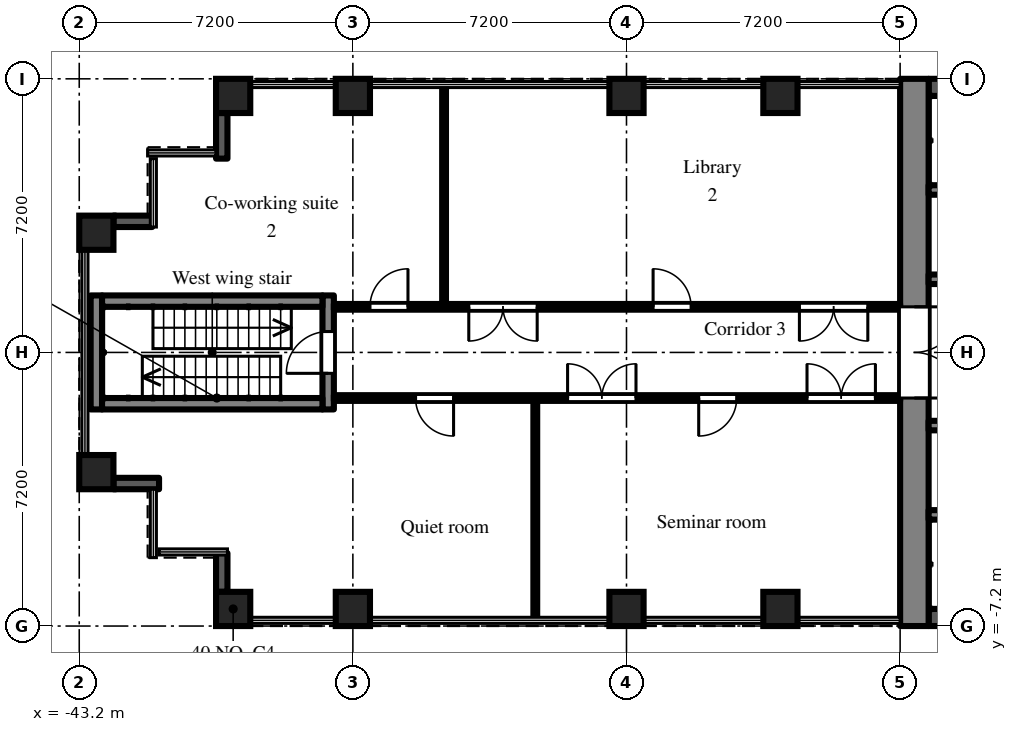
"""IFC4 building model, lengths in metres.
Left out: names, types, materials, properties, quantities, classifications, styles, units other than length and angle.
Written with IfcOpenShell. Run it as: python <this file> out.ifc"""

import sys

from ifc_helpers import new_model, si_unit, direction, frame, frame_2d, origin, origin_2d, place, context, subcontext, project, spatial, rectangle, extrude, element, fill, save


model = new_model("IFC4")
c1 = context("Model", 3, precision=1e-05, world=origin(), true_north=direction((0.0, 1.0)))
c2 = subcontext(c1, "Body", "Model", "MODEL_VIEW")
j1 = project(units=[si_unit("LENGTHUNIT", "METRE"), si_unit("PLANEANGLEUNIT", "RADIAN")], contexts=[c1])
p1 = place(None, origin())
s1 = spatial("IfcSite", under=j1, at=p1, CompositionType="ELEMENT")
p2 = place(p1, origin())
s2 = spatial("IfcBuilding", under=s1, at=p2, CompositionType="ELEMENT")
p3 = place(p2, frame((0.0, 0.0, 116.1)))
s3 = spatial("IfcBuildingStorey", under=s2, at=p3, CompositionType="ELEMENT", Elevation=116.1)
for number, where, z_axis, x_axis in (
    (1, (-42.75, -3.15, 0.0), (0.0, 0.0, 1.0), (1.0, 0.0, 0.0)),
    (2, (-42.75, 3.15, 0.0), (0.0, 0.0, 1.0), (1.0, 0.0, 0.0)),
    (3, (-39.15, -6.75, 0.0), (0.0, 0.0, 1.0), (1.0, 0.0, 0.0)),
    (4, (-39.15, 6.75, 0.0), (0.0, 0.0, 1.0), (1.0, 0.0, 0.0)),
    (5, (-36.0, -6.75, 0.0), (0.0, 0.0, 1.0), (1.0, 0.0, 0.0)),
    (6, (-36.0, 6.75, 0.0), (0.0, 0.0, 1.0), (1.0, 0.0, 0.0)),
    (7, (-28.8, -6.75, 0.0), (0.0, 0.0, 1.0), (1.0, 0.0, 0.0)),
    (8, (-28.8, 6.75, 0.0), (0.0, 0.0, 1.0), (1.0, 0.0, 0.0)),
    (9, (-24.75, -6.75, 0.0), (0.0, 0.0, 1.0), (1.0, 0.0, 0.0)),
    (10, (-24.75, 6.75, 0.0), (0.0, 0.0, 1.0), (1.0, 0.0, 0.0)),
):
    element("IfcColumn", number, at=place(p3, frame(where, z_axis=z_axis, x_axis=x_axis)), inside=s3, PredefinedType="COLUMN", context=c2, shape_type="SweptSolid", body=[
        extrude(rectangle(XDim=0.9, YDim=0.9, at=origin_2d()), origin(), (0.0, 0.0, 1.0), 4.2),
    ])
p4 = place(p3, frame((-39.45, 6.3, 0.0), z_axis=(0.0, 0.0, 1.0), x_axis=(0.0, -1.0, 0.0)))
e11 = element("IfcWall", 11, at=p4, inside=s3, PredefinedType="SOLIDWALL", context=c2, shape_type="SweptSolid", body=[
    extrude(rectangle(XDim=1.2, YDim=0.3, at=frame_2d((0.6, 0.0))), origin(), (0.0, 0.0, 1.0), 3.8),
])
p5 = place(p3, frame((-41.28, 3.45, 0.0), z_axis=(0.0, 0.0, 1.0), x_axis=(-1.0, 0.0, 0.0)))
e12 = element("IfcWall", 12, at=p5, inside=s3, PredefinedType="SOLIDWALL", context=c2, shape_type="SweptSolid", body=[
    extrude(rectangle(XDim=1.02, YDim=0.3, at=frame_2d((0.51, 0.0))), origin(), (0.0, 0.0, 1.0), 3.8),
])
p6 = place(p3, frame((-42.3, -3.45, 0.0), z_axis=(0.0, 0.0, 1.0), x_axis=(1.0, 0.0, 0.0)))
e13 = element("IfcWall", 13, at=p6, inside=s3, PredefinedType="SOLIDWALL", context=c2, shape_type="SweptSolid", body=[
    extrude(rectangle(XDim=1.2, YDim=0.3, at=frame_2d((0.6, 0.0))), origin(), (0.0, 0.0, 1.0), 3.8),
])
p7 = place(p3, frame((-39.45, -5.28, 0.0), z_axis=(0.0, 0.0, 1.0), x_axis=(0.0, -1.0, 0.0)))
e14 = element("IfcWall", 14, at=p7, inside=s3, PredefinedType="SOLIDWALL", context=c2, shape_type="SweptSolid", body=[
    extrude(rectangle(XDim=1.02, YDim=0.3, at=frame_2d((0.51, 0.0))), origin(), (0.0, 0.0, 1.0), 3.8),
])
p8 = place(p3, frame((-21.225, -7.2, 0.0), z_axis=(0.0, 0.0, 1.0), x_axis=(0.0, 1.0, 0.0)))
e15 = element("IfcWall", 15, at=p8, inside=s3, PredefinedType="SHEAR", context=c2, shape_type="SweptSolid", body=[
    extrude(rectangle(XDim=14.4, YDim=0.75, at=frame_2d((7.2, 0.0))), origin(), (0.0, 0.0, 1.0), 3.8),
])
p9 = place(p8, frame((6.0, 0.0, 0.0)))
e16 = element("IfcOpeningElement", 16, at=p9, cuts=e15, PredefinedType="OPENING", context=c2, shape_type="SweptSolid", body=[
    extrude(rectangle(XDim=2.4, YDim=2.2, at=frame_2d((1.2, 1.1))), frame((0.0, 0.385, 0.0), z_axis=(0.0, -1.0, 0.0), x_axis=(1.0, 0.0, 0.0)), (0.0, 0.0, 1.0), 0.77),
])
p10 = place(p3, frame((-7.9, 6.975, 0.0), z_axis=(0.0, 0.0, 1.0), x_axis=(-1.0, 0.0, 0.0)))
e17 = element("IfcWall", 17, at=p10, inside=s3, PredefinedType="SHEAR", context=c2, shape_type="SweptSolid", body=[
    extrude(rectangle(XDim=12.95, YDim=0.45, at=frame_2d((6.475, 0.0))), origin(), (0.0, 0.0, 1.0), 3.8),
])
p11 = place(p3, frame((-7.9, 1.925, 0.0), z_axis=(0.0, 0.0, 1.0), x_axis=(-1.0, 0.0, 0.0)))
e18 = element("IfcWall", 18, at=p11, inside=s3, PredefinedType="SHEAR", context=c2, shape_type="SweptSolid", body=[
    extrude(rectangle(XDim=12.95, YDim=0.25, at=frame_2d((6.475, 0.0))), origin(), (0.0, 0.0, 1.0), 3.8),
])
p12 = place(p11, frame((4.825, 0.0, 0.0)))
e19 = element("IfcOpeningElement", 19, at=p12, cuts=e18, PredefinedType="OPENING", context=c2, shape_type="SweptSolid", body=[
    extrude(rectangle(XDim=1.1, YDim=2.1, at=frame_2d((0.55, 1.05))), frame((0.0, 0.135, 0.0), z_axis=(0.0, -1.0, 0.0), x_axis=(1.0, 0.0, 0.0)), (0.0, 0.0, 1.0), 0.27),
])
p13 = place(p11, frame((7.025, 0.0, 0.0)))
e20 = element("IfcOpeningElement", 20, at=p13, cuts=e18, PredefinedType="OPENING", context=c2, shape_type="SweptSolid", body=[
    extrude(rectangle(XDim=1.1, YDim=2.1, at=frame_2d((0.55, 1.05))), frame((0.0, 0.135, 0.0), z_axis=(0.0, -1.0, 0.0), x_axis=(1.0, 0.0, 0.0)), (0.0, 0.0, 1.0), 0.27),
])
p14 = place(p11, frame((9.225, 0.0, 0.0)))
e21 = element("IfcOpeningElement", 21, at=p14, cuts=e18, PredefinedType="OPENING", context=c2, shape_type="SweptSolid", body=[
    extrude(rectangle(XDim=1.1, YDim=2.1, at=frame_2d((0.55, 1.05))), frame((0.0, 0.135, 0.0), z_axis=(0.0, -1.0, 0.0), x_axis=(1.0, 0.0, 0.0)), (0.0, 0.0, 1.0), 0.27),
])
p15 = place(p11, frame((11.425, 0.0, 0.0)))
e22 = element("IfcOpeningElement", 22, at=p15, cuts=e18, PredefinedType="OPENING", context=c2, shape_type="SweptSolid", body=[
    extrude(rectangle(XDim=1.1, YDim=2.1, at=frame_2d((0.55, 1.05))), frame((0.0, 0.135, 0.0), z_axis=(0.0, -1.0, 0.0), x_axis=(1.0, 0.0, 0.0)), (0.0, 0.0, 1.0), 0.27),
])
p16 = place(p11, frame((0.525, 0.0, 0.0)))
e23 = element("IfcOpeningElement", 23, at=p16, cuts=e18, PredefinedType="OPENING", context=c2, shape_type="SweptSolid", body=[
    extrude(rectangle(XDim=0.9, YDim=2.1, at=frame_2d((0.45, 1.05))), frame((0.0, 0.135, 0.0), z_axis=(0.0, -1.0, 0.0), x_axis=(1.0, 0.0, 0.0)), (0.0, 0.0, 1.0), 0.27),
])
p17 = place(p11, frame((2.575, 0.0, 0.0)))
e24 = element("IfcOpeningElement", 24, at=p17, cuts=e18, PredefinedType="OPENING", context=c2, shape_type="SweptSolid", body=[
    extrude(rectangle(XDim=1.2, YDim=2.1, at=frame_2d((0.6, 1.05))), frame((0.0, 0.135, 0.0), z_axis=(0.0, -1.0, 0.0), x_axis=(1.0, 0.0, 0.0)), (0.0, 0.0, 1.0), 0.27),
])
p18 = place(p3, frame((-12.3, 4.275, 0.0), z_axis=(0.0, 0.0, 1.0), x_axis=(-1.0, 0.0, 0.0)))
e25 = element("IfcWall", 25, at=p18, inside=s3, PredefinedType="SHEAR", context=c2, shape_type="SweptSolid", body=[
    extrude(rectangle(XDim=8.55, YDim=0.25, at=frame_2d((4.275, 0.0))), origin(), (0.0, 0.0, 1.0), 3.8),
])
p19 = place(p3, frame((-7.9, -6.975, 0.0), z_axis=(0.0, 0.0, 1.0), x_axis=(-1.0, 0.0, 0.0)))
e26 = element("IfcWall", 26, at=p19, inside=s3, PredefinedType="SHEAR", context=c2, shape_type="SweptSolid", body=[
    extrude(rectangle(XDim=12.95, YDim=0.45, at=frame_2d((6.475, 0.0))), origin(), (0.0, 0.0, 1.0), 3.8),
])
p20 = place(p3, frame((-7.9, -1.925, 0.0), z_axis=(0.0, 0.0, 1.0), x_axis=(-1.0, 0.0, 0.0)))
e27 = element("IfcWall", 27, at=p20, inside=s3, PredefinedType="SHEAR", context=c2, shape_type="SweptSolid", body=[
    extrude(rectangle(XDim=12.95, YDim=0.25, at=frame_2d((6.475, 0.0))), origin(), (0.0, 0.0, 1.0), 3.8),
])
p21 = place(p20, frame((4.825, 0.0, 0.0)))
e28 = element("IfcOpeningElement", 28, at=p21, cuts=e27, PredefinedType="OPENING", context=c2, shape_type="SweptSolid", body=[
    extrude(rectangle(XDim=1.1, YDim=2.1, at=frame_2d((0.55, 1.05))), frame((0.0, 0.135, 0.0), z_axis=(0.0, -1.0, 0.0), x_axis=(1.0, 0.0, 0.0)), (0.0, 0.0, 1.0), 0.27),
])
p22 = place(p20, frame((7.025, 0.0, 0.0)))
e29 = element("IfcOpeningElement", 29, at=p22, cuts=e27, PredefinedType="OPENING", context=c2, shape_type="SweptSolid", body=[
    extrude(rectangle(XDim=1.1, YDim=2.1, at=frame_2d((0.55, 1.05))), frame((0.0, 0.135, 0.0), z_axis=(0.0, -1.0, 0.0), x_axis=(1.0, 0.0, 0.0)), (0.0, 0.0, 1.0), 0.27),
])
p23 = place(p20, frame((9.225, 0.0, 0.0)))
e30 = element("IfcOpeningElement", 30, at=p23, cuts=e27, PredefinedType="OPENING", context=c2, shape_type="SweptSolid", body=[
    extrude(rectangle(XDim=1.1, YDim=2.1, at=frame_2d((0.55, 1.05))), frame((0.0, 0.135, 0.0), z_axis=(0.0, -1.0, 0.0), x_axis=(1.0, 0.0, 0.0)), (0.0, 0.0, 1.0), 0.27),
])
p24 = place(p20, frame((11.425, 0.0, 0.0)))
e31 = element("IfcOpeningElement", 31, at=p24, cuts=e27, PredefinedType="OPENING", context=c2, shape_type="SweptSolid", body=[
    extrude(rectangle(XDim=1.1, YDim=2.1, at=frame_2d((0.55, 1.05))), frame((0.0, 0.135, 0.0), z_axis=(0.0, -1.0, 0.0), x_axis=(1.0, 0.0, 0.0)), (0.0, 0.0, 1.0), 0.27),
])
p25 = place(p20, frame((0.525, 0.0, 0.0)))
e32 = element("IfcOpeningElement", 32, at=p25, cuts=e27, PredefinedType="OPENING", context=c2, shape_type="SweptSolid", body=[
    extrude(rectangle(XDim=0.9, YDim=2.1, at=frame_2d((0.45, 1.05))), frame((0.0, 0.135, 0.0), z_axis=(0.0, -1.0, 0.0), x_axis=(1.0, 0.0, 0.0)), (0.0, 0.0, 1.0), 0.27),
])
p26 = place(p20, frame((2.575, 0.0, 0.0)))
e33 = element("IfcOpeningElement", 33, at=p26, cuts=e27, PredefinedType="OPENING", context=c2, shape_type="SweptSolid", body=[
    extrude(rectangle(XDim=1.2, YDim=2.1, at=frame_2d((0.6, 1.05))), frame((0.0, 0.135, 0.0), z_axis=(0.0, -1.0, 0.0), x_axis=(1.0, 0.0, 0.0)), (0.0, 0.0, 1.0), 0.27),
])
p27 = place(p3, frame((-12.3, -4.275, 0.0), z_axis=(0.0, 0.0, 1.0), x_axis=(-1.0, 0.0, 0.0)))
e34 = element("IfcWall", 34, at=p27, inside=s3, PredefinedType="SHEAR", context=c2, shape_type="SweptSolid", body=[
    extrude(rectangle(XDim=8.55, YDim=0.25, at=frame_2d((4.275, 0.0))), origin(), (0.0, 0.0, 1.0), 3.8),
])
p28 = place(p3, frame((-36.65, -1.5, 0.0), z_axis=(0.0, 0.0, 1.0), x_axis=(0.0, 1.0, 0.0)))
e35 = element("IfcWall", 35, at=p28, inside=s3, PredefinedType="SHEAR", context=c2, shape_type="SweptSolid", body=[
    extrude(rectangle(XDim=3.0, YDim=0.3, at=frame_2d((1.5, 0.0))), origin(), (0.0, 0.0, 1.0), 3.8),
])
p29 = place(p28, frame((0.95, 0.0, 0.0)))
e36 = element("IfcOpeningElement", 36, at=p29, cuts=e35, PredefinedType="OPENING", context=c2, shape_type="SweptSolid", body=[
    extrude(rectangle(XDim=1.1, YDim=2.1, at=frame_2d((0.55, 1.05))), frame((0.0, 0.16, 0.0), z_axis=(0.0, -1.0, 0.0), x_axis=(1.0, 0.0, 0.0)), (0.0, 0.0, 1.0), 0.32),
])
p30 = place(p3, frame((-42.75, -1.5, 0.0), z_axis=(0.0, 0.0, 1.0), x_axis=(0.0, 1.0, 0.0)))
e37 = element("IfcWall", 37, at=p30, inside=s3, PredefinedType="SHEAR", context=c2, shape_type="SweptSolid", body=[
    extrude(rectangle(XDim=3.0, YDim=0.3, at=frame_2d((1.5, 0.0))), origin(), (0.0, 0.0, 1.0), 3.8),
])
for number, where, z_axis, x_axis in (
    (38, (-36.8, -1.35, 0.0), (0.0, 0.0, 1.0), (-1.0, 0.0, 0.0)),
    (39, (-36.8, 1.35, 0.0), (0.0, 0.0, 1.0), (-1.0, 0.0, 0.0)),
):
    element("IfcWall", number, at=place(p3, frame(where, z_axis=z_axis, x_axis=x_axis)), inside=s3, PredefinedType="SHEAR", context=c2, shape_type="SweptSolid", body=[
        extrude(rectangle(XDim=5.8, YDim=0.3, at=frame_2d((2.9, 0.0))), origin(), (0.0, 0.0, 1.0), 3.8),
    ])
p31 = place(p3, frame((-36.5, -1.2, 0.0), z_axis=(0.0, 0.0, 1.0), x_axis=(1.0, 0.0, 0.0)))
e40 = element("IfcWall", 40, at=p31, inside=s3, PredefinedType="PARTITIONING", context=c2, shape_type="SweptSolid", body=[
    extrude(rectangle(XDim=14.9, YDim=0.15, at=frame_2d((7.45, 0.0))), origin(), (0.0, 0.0, 1.0), 3.8),
])
p32 = place(p31, frame((6.15, 0.0, 0.0)))
e41 = element("IfcOpeningElement", 41, at=p32, cuts=e40, PredefinedType="OPENING", context=c2, shape_type="SweptSolid", body=[
    extrude(rectangle(XDim=1.8, YDim=2.1, at=frame_2d((0.9, 1.05))), frame((0.0, 0.085, 0.0), z_axis=(0.0, -1.0, 0.0), x_axis=(1.0, 0.0, 0.0)), (0.0, 0.0, 1.0), 0.17),
])
p33 = place(p31, frame((9.6, 0.0, 0.0)))
e42 = element("IfcOpeningElement", 42, at=p33, cuts=e40, PredefinedType="OPENING", context=c2, shape_type="SweptSolid", body=[
    extrude(rectangle(XDim=1.0, YDim=2.1, at=frame_2d((0.5, 1.05))), frame((0.0, 0.085, 0.0), z_axis=(0.0, -1.0, 0.0), x_axis=(1.0, 0.0, 0.0)), (0.0, 0.0, 1.0), 0.17),
])
p34 = place(p31, frame((12.45, 0.0, 0.0)))
e43 = element("IfcOpeningElement", 43, at=p34, cuts=e40, PredefinedType="OPENING", context=c2, shape_type="SweptSolid", body=[
    extrude(rectangle(XDim=1.8, YDim=2.1, at=frame_2d((0.9, 1.05))), frame((0.0, 0.085, 0.0), z_axis=(0.0, -1.0, 0.0), x_axis=(1.0, 0.0, 0.0)), (0.0, 0.0, 1.0), 0.17),
])
p35 = place(p31, frame((2.15, 0.0, 0.0)))
e44 = element("IfcOpeningElement", 44, at=p35, cuts=e40, PredefinedType="OPENING", context=c2, shape_type="SweptSolid", body=[
    extrude(rectangle(XDim=1.0, YDim=2.1, at=frame_2d((0.5, 1.05))), frame((0.0, 0.085, 0.0), z_axis=(0.0, -1.0, 0.0), x_axis=(1.0, 0.0, 0.0)), (0.0, 0.0, 1.0), 0.17),
])
p36 = place(p3, frame((-36.5, 1.2, 0.0), z_axis=(0.0, 0.0, 1.0), x_axis=(1.0, 0.0, 0.0)))
e45 = element("IfcWall", 45, at=p36, inside=s3, PredefinedType="PARTITIONING", context=c2, shape_type="SweptSolid", body=[
    extrude(rectangle(XDim=14.9, YDim=0.15, at=frame_2d((7.45, 0.0))), origin(), (0.0, 0.0, 1.0), 3.8),
])
p37 = place(p36, frame((3.55, 0.0, 0.0)))
e46 = element("IfcOpeningElement", 46, at=p37, cuts=e45, PredefinedType="OPENING", context=c2, shape_type="SweptSolid", body=[
    extrude(rectangle(XDim=1.8, YDim=2.1, at=frame_2d((0.9, 1.05))), frame((0.0, 0.085, 0.0), z_axis=(0.0, -1.0, 0.0), x_axis=(1.0, 0.0, 0.0)), (0.0, 0.0, 1.0), 0.17),
])
p38 = place(p36, frame((8.4, 0.0, 0.0)))
e47 = element("IfcOpeningElement", 47, at=p38, cuts=e45, PredefinedType="OPENING", context=c2, shape_type="SweptSolid", body=[
    extrude(rectangle(XDim=1.0, YDim=2.1, at=frame_2d((0.5, 1.05))), frame((0.0, 0.085, 0.0), z_axis=(0.0, -1.0, 0.0), x_axis=(1.0, 0.0, 0.0)), (0.0, 0.0, 1.0), 0.17),
])
p39 = place(p36, frame((12.25, 0.0, 0.0)))
e48 = element("IfcOpeningElement", 48, at=p39, cuts=e45, PredefinedType="OPENING", context=c2, shape_type="SweptSolid", body=[
    extrude(rectangle(XDim=1.8, YDim=2.1, at=frame_2d((0.9, 1.05))), frame((0.0, 0.085, 0.0), z_axis=(0.0, -1.0, 0.0), x_axis=(1.0, 0.0, 0.0)), (0.0, 0.0, 1.0), 0.17),
])
p40 = place(p36, frame((0.95, 0.0, 0.0)))
e49 = element("IfcOpeningElement", 49, at=p40, cuts=e45, PredefinedType="OPENING", context=c2, shape_type="SweptSolid", body=[
    extrude(rectangle(XDim=1.0, YDim=2.1, at=frame_2d((0.5, 1.05))), frame((0.0, 0.085, 0.0), z_axis=(0.0, -1.0, 0.0), x_axis=(1.0, 0.0, 0.0)), (0.0, 0.0, 1.0), 0.17),
])
for number, where, z_axis, x_axis in (
    (50, (-33.6, 1.275, 0.0), (0.0, 0.0, 1.0), (0.0, 1.0, 0.0)),
    (51, (-31.2, -7.02, 0.0), (0.0, 0.0, 1.0), (0.0, 1.0, 0.0)),
):
    element("IfcWall", number, at=place(p3, frame(where, z_axis=z_axis, x_axis=x_axis)), inside=s3, PredefinedType="PARTITIONING", context=c2, shape_type="SweptSolid", body=[
        extrude(rectangle(XDim=5.745, YDim=0.1, at=frame_2d((2.873, 0.0))), origin(), (0.0, 0.0, 1.0), 3.8),
    ])
p41 = place(p9, frame((2.4, 0.0, 0.0), z_axis=(0.0, 0.0, 1.0), x_axis=(-1.0, 0.0, 0.0)))
e52 = element("IfcDoor", 52, at=p41, inside=s3, OperationType="DOUBLE_DOOR_DOUBLE_SWING", PredefinedType="DOOR", context=c2, shape_type="SweptSolid", body=[
    extrude(rectangle(XDim=2.4, YDim=2.2, at=frame_2d((1.2, 1.1))), frame((0.0, 0.025, 0.0), z_axis=(0.0, -1.0, 0.0), x_axis=(1.0, 0.0, 0.0)), (0.0, 0.0, 1.0), 0.05),
])
fill(e16, e52)
p42 = place(p29, origin())
e53 = element("IfcDoor", 53, at=p42, inside=s3, OperationType="SINGLE_SWING_LEFT", PredefinedType="DOOR", context=c2, shape_type="SweptSolid", body=[
    extrude(rectangle(XDim=1.1, YDim=2.1, at=frame_2d((0.55, 1.05))), frame((0.0, 0.025, 0.0), z_axis=(0.0, -1.0, 0.0), x_axis=(1.0, 0.0, 0.0)), (0.0, 0.0, 1.0), 0.05),
])
fill(e36, e53)
p43 = place(p32, origin())
e54 = element("IfcDoor", 54, at=p43, inside=s3, OperationType="DOUBLE_DOOR_DOUBLE_SWING", PredefinedType="DOOR", context=c2, shape_type="SweptSolid", body=[
    extrude(rectangle(XDim=1.8, YDim=2.1, at=frame_2d((0.9, 1.05))), frame((0.0, 0.025, 0.0), z_axis=(0.0, -1.0, 0.0), x_axis=(1.0, 0.0, 0.0)), (0.0, 0.0, 1.0), 0.05),
])
fill(e41, e54)
p44 = place(p33, frame((1.0, 0.0, 0.0), z_axis=(0.0, 0.0, 1.0), x_axis=(-1.0, 0.0, 0.0)))
e55 = element("IfcDoor", 55, at=p44, inside=s3, OperationType="SINGLE_SWING_RIGHT", PredefinedType="DOOR", context=c2, shape_type="SweptSolid", body=[
    extrude(rectangle(XDim=1.0, YDim=2.1, at=frame_2d((0.5, 1.05))), frame((0.0, 0.025, 0.0), z_axis=(0.0, -1.0, 0.0), x_axis=(1.0, 0.0, 0.0)), (0.0, 0.0, 1.0), 0.05),
])
fill(e42, e55)
p45 = place(p34, origin())
e56 = element("IfcDoor", 56, at=p45, inside=s3, OperationType="DOUBLE_DOOR_DOUBLE_SWING", PredefinedType="DOOR", context=c2, shape_type="SweptSolid", body=[
    extrude(rectangle(XDim=1.8, YDim=2.1, at=frame_2d((0.9, 1.05))), frame((0.0, 0.025, 0.0), z_axis=(0.0, -1.0, 0.0), x_axis=(1.0, 0.0, 0.0)), (0.0, 0.0, 1.0), 0.05),
])
fill(e43, e56)
p46 = place(p35, frame((1.0, 0.0, 0.0), z_axis=(0.0, 0.0, 1.0), x_axis=(-1.0, 0.0, 0.0)))
e57 = element("IfcDoor", 57, at=p46, inside=s3, OperationType="SINGLE_SWING_LEFT", PredefinedType="DOOR", context=c2, shape_type="SweptSolid", body=[
    extrude(rectangle(XDim=1.0, YDim=2.1, at=frame_2d((0.5, 1.05))), frame((0.0, 0.025, 0.0), z_axis=(0.0, -1.0, 0.0), x_axis=(1.0, 0.0, 0.0)), (0.0, 0.0, 1.0), 0.05),
])
fill(e44, e57)
p47 = place(p37, frame((1.8, 0.0, 0.0), z_axis=(0.0, 0.0, 1.0), x_axis=(-1.0, 0.0, 0.0)))
e58 = element("IfcDoor", 58, at=p47, inside=s3, OperationType="DOUBLE_DOOR_DOUBLE_SWING", PredefinedType="DOOR", context=c2, shape_type="SweptSolid", body=[
    extrude(rectangle(XDim=1.8, YDim=2.1, at=frame_2d((0.9, 1.05))), frame((0.0, 0.025, 0.0), z_axis=(0.0, -1.0, 0.0), x_axis=(1.0, 0.0, 0.0)), (0.0, 0.0, 1.0), 0.05),
])
fill(e46, e58)
p48 = place(p38, origin())
e59 = element("IfcDoor", 59, at=p48, inside=s3, OperationType="SINGLE_SWING_LEFT", PredefinedType="DOOR", context=c2, shape_type="SweptSolid", body=[
    extrude(rectangle(XDim=1.0, YDim=2.1, at=frame_2d((0.5, 1.05))), frame((0.0, 0.025, 0.0), z_axis=(0.0, -1.0, 0.0), x_axis=(1.0, 0.0, 0.0)), (0.0, 0.0, 1.0), 0.05),
])
fill(e47, e59)
p49 = place(p39, frame((1.8, 0.0, 0.0), z_axis=(0.0, 0.0, 1.0), x_axis=(-1.0, 0.0, 0.0)))
e60 = element("IfcDoor", 60, at=p49, inside=s3, OperationType="DOUBLE_DOOR_DOUBLE_SWING", PredefinedType="DOOR", context=c2, shape_type="SweptSolid", body=[
    extrude(rectangle(XDim=1.8, YDim=2.1, at=frame_2d((0.9, 1.05))), frame((0.0, 0.025, 0.0), z_axis=(0.0, -1.0, 0.0), x_axis=(1.0, 0.0, 0.0)), (0.0, 0.0, 1.0), 0.05),
])
fill(e48, e60)
p50 = place(p40, origin())
e61 = element("IfcDoor", 61, at=p50, inside=s3, OperationType="SINGLE_SWING_RIGHT", PredefinedType="DOOR", context=c2, shape_type="SweptSolid", body=[
    extrude(rectangle(XDim=1.0, YDim=2.1, at=frame_2d((0.5, 1.05))), frame((0.0, 0.025, 0.0), z_axis=(0.0, -1.0, 0.0), x_axis=(1.0, 0.0, 0.0)), (0.0, 0.0, 1.0), 0.05),
])
fill(e49, e61)
save(model, sys.argv[1])
